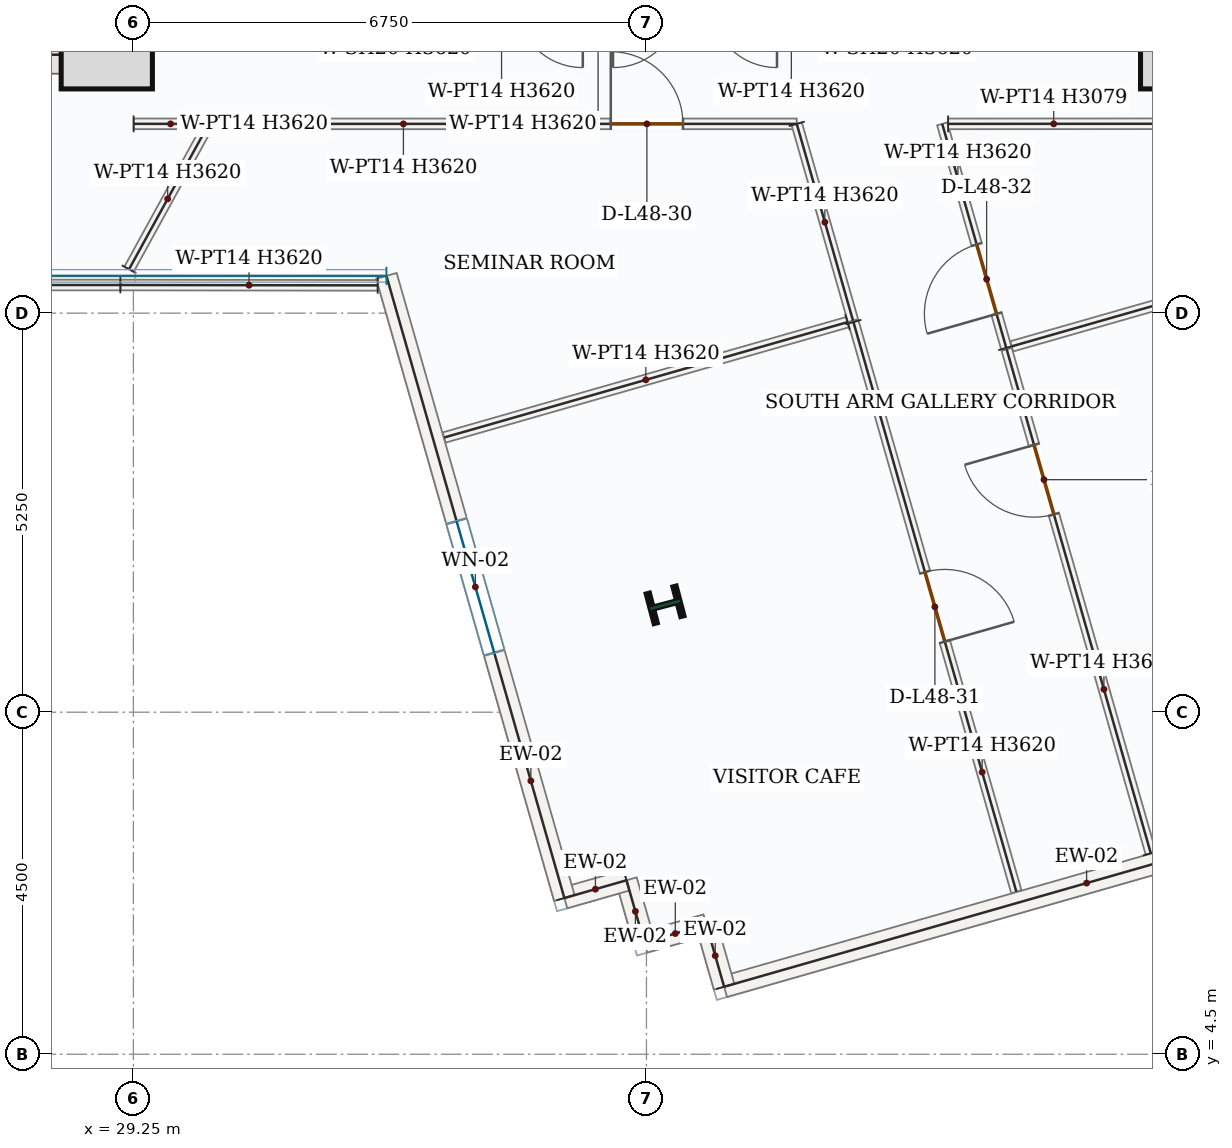
"""IFC4 building model, lengths in metres.
Left out: names, types, materials, properties, quantities, classifications, styles, units other than length and angle.
Written with IfcOpenShell. Run it as: python <this file> out.ifc"""

import sys

from ifc_helpers import new_model, si_unit, direction, frame, frame_2d, origin, origin_2d, place, context, subcontext, project, spatial, rectangle, i_section, extrude, source, transform, mapped, element, fill, save


model = new_model("IFC4")
c1 = context("Model", 3, precision=1e-05, world=origin(), true_north=direction((0.0, 1.0)))
c2 = subcontext(c1, "Body", "Model", "MODEL_VIEW")
j1 = project(units=[si_unit("LENGTHUNIT", "METRE"), si_unit("PLANEANGLEUNIT", "RADIAN")], contexts=[c1])
p1 = place(None, origin())
s1 = spatial("IfcSite", under=j1, at=p1, CompositionType="ELEMENT")
p2 = place(p1, origin())
s2 = spatial("IfcBuilding", under=s1, at=p2, CompositionType="ELEMENT")
p3 = place(p2, frame((0.0, 0.0, 205.8)))
s3 = spatial("IfcBuildingStorey", under=s2, at=p3, CompositionType="ELEMENT", Elevation=205.8)
p4 = place(p3, frame((29.0, 17.4, 0.0), z_axis=(0.0, 0.0, 1.0), x_axis=(0.0, 1.0, 0.0)))
e1 = element("IfcWall", 1, at=p4, inside=s3, PredefinedType="SHEAR", context=c2, shape_type="SweptSolid", body=[
    extrude(rectangle(XDim=8.55, YDim=0.5, at=frame_2d((4.275, 0.0))), origin(), (0.0, 0.0, 1.0), 3.62),
])
p5 = place(p4, frame((6.65, 0.0, 0.0)))
e2 = element("IfcOpeningElement", 2, at=p5, cuts=e1, PredefinedType="OPENING", context=c2, shape_type="SweptSolid", body=[
    extrude(rectangle(XDim=1.1, YDim=2.2, at=frame_2d((0.55, 1.1))), frame((0.0, 0.26, 0.0), z_axis=(0.0, -1.0, 0.0), x_axis=(1.0, 0.0, 0.0)), (0.0, 0.0, 1.0), 0.52),
])
p6 = place(p4, frame((2.7, 0.0, 0.0)))
e3 = element("IfcOpeningElement", 3, at=p6, cuts=e1, PredefinedType="OPENING", context=c2, shape_type="SweptSolid", body=[
    extrude(rectangle(XDim=0.88, YDim=2.1, at=frame_2d((0.44, 1.05))), frame((0.0, 0.26, 0.0), z_axis=(0.0, -1.0, 0.0), x_axis=(1.0, 0.0, 0.0)), (0.0, 0.0, 1.0), 0.52),
])
p7 = place(p4, frame((4.6, 0.0, 0.0)))
e4 = element("IfcOpeningElement", 4, at=p7, cuts=e1, PredefinedType="OPENING", context=c2, shape_type="SweptSolid", body=[
    extrude(rectangle(XDim=0.88, YDim=2.1, at=frame_2d((0.44, 1.05))), frame((0.0, 0.26, 0.0), z_axis=(0.0, -1.0, 0.0), x_axis=(1.0, 0.0, 0.0)), (0.0, 0.0, 1.0), 0.52),
])
m1 = source(origin(), c2, "Body", "SweptSolid", [
    extrude(rectangle(XDim=7.0, YDim=0.5, at=frame_2d((3.5, 0.0))), origin(), (0.0, 0.0, 1.0), 3.62),
])
p8 = place(p3, frame((21.75, 17.65, 0.0), z_axis=(0.0, 0.0, 1.0), x_axis=(1.0, 0.0, 0.0)))
e5 = element("IfcWall", 5, at=p8, inside=s3, PredefinedType="SHEAR", context=c2, shape_type="MappedRepresentation", body=[
    mapped(m1, transform((0.0, 0.0, 0.0), x_axis=(1.0, 0.0, 0.0), y_axis=(0.0, 1.0, 0.0), z_axis=(0.0, 0.0, 1.0), scale=1.0)),
])
m2 = source(origin(), c2, "Body", "SweptSolid", [
    extrude(rectangle(XDim=1.2, YDim=1.2, at=origin_2d()), origin(), (0.0, 0.0, 1.0), 3.9),
])
for number, where, z_axis, x_axis in (
    (6, (28.9, 17.8, 0.0), (0.0, 0.0, 1.0), (1.0, 0.0, 0.0)),
    (7, (43.1, 17.8, 0.0), (0.0, 0.0, 1.0), (1.0, 0.0, 0.0)),
):
    element("IfcColumn", number, at=place(p3, frame(where, z_axis=z_axis, x_axis=x_axis)), inside=s3, PredefinedType="COLUMN", context=c2, shape_type="MappedRepresentation", body=[
        mapped(m2, transform((0.0, 0.0, 0.0), x_axis=(1.0, 0.0, 0.0), y_axis=(0.0, 1.0, 0.0), z_axis=(0.0, 0.0, 1.0), scale=1.0)),
    ])
m3 = source(origin(), c2, "Body", "SweptSolid", [
    extrude(i_section(OverallWidth=0.404, OverallDepth=0.407, WebThickness=0.027, FlangeThickness=0.044, FilletRadius=0.018, at=origin_2d()), origin(), (0.0, 0.0, 1.0), 3.9),
])
p9 = place(p3, frame((36.245, 10.412, 0.0), z_axis=(0.0, 0.0, 1.0), x_axis=(-0.255445757936, 0.966823388604, 0.0)))
e8 = element("IfcColumn", 8, at=p9, inside=s3, PredefinedType="COLUMN", context=c2, shape_type="MappedRepresentation", body=[
    mapped(m3, transform((0.0, 0.0, 0.0), x_axis=(1.0, 0.0, 0.0), y_axis=(0.0, 1.0, 0.0), z_axis=(0.0, 0.0, 1.0), scale=1.0)),
])
m4 = source(origin(), c2, "Body", "SweptSolid", [
    extrude(rectangle(XDim=9.92, YDim=0.28, at=frame_2d((4.96, 0.0))), origin(), (0.0, 0.0, 1.0), 3.62),
])
p10 = place(p3, frame((46.56, 8.115, 0.0), z_axis=(0.0, 0.0, 1.0), x_axis=(-0.961457051276, -0.274955157346, 0.0)))
e9 = element("IfcWall", 9, at=p10, inside=s3, PredefinedType="SOLIDWALL", context=c2, shape_type="MappedRepresentation", body=[
    mapped(m4, transform((0.0, 0.0, 0.0), x_axis=(1.0, 0.0, 0.0), y_axis=(0.0, 1.0, 0.0), z_axis=(0.0, 0.0, 1.0), scale=1.0)),
])
m5 = source(origin(), c2, "Body", "SweptSolid", [
    extrude(rectangle(XDim=0.85, YDim=0.28, at=frame_2d((0.425, 0.0))), origin(), (0.0, 0.0, 1.0), 3.62),
])
for number, where, z_axis, x_axis in (
    (10, (37.022, 5.388, 0.0), (0.0, 0.0, 1.0), (-0.275, 0.961, 0.0)),
    (11, (36.788, 6.205, 0.0), (0.0, 0.0, 1.0), (-0.961, -0.275, 0.0)),
):
    element("IfcWall", number, at=place(p3, frame(where, z_axis=z_axis, x_axis=x_axis)), inside=s3, PredefinedType="SOLIDWALL", context=c2, shape_type="MappedRepresentation", body=[
        mapped(m5, transform((0.0, 0.0, 0.0), x_axis=(1.0, 0.0, 0.0), y_axis=(0.0, 1.0, 0.0), z_axis=(0.0, 0.0, 1.0), scale=1.0)),
    ])
m6 = source(origin(), c2, "Body", "SweptSolid", [
    extrude(rectangle(XDim=0.85, YDim=0.28, at=frame_2d((0.425, 0.0))), origin(), (0.0, 0.0, 1.0), 3.62),
])
p11 = place(p3, frame((35.971, 5.971, 0.0), z_axis=(0.0, 0.0, 1.0), x_axis=(-0.274834915789, 0.961491429532, 0.0)))
e12 = element("IfcWall", 12, at=p11, inside=s3, PredefinedType="SOLIDWALL", context=c2, shape_type="MappedRepresentation", body=[
    mapped(m6, transform((0.0, 0.0, 0.0), x_axis=(1.0, 0.0, 0.0), y_axis=(0.0, 1.0, 0.0), z_axis=(0.0, 0.0, 1.0), scale=1.0)),
])
p12 = place(p3, frame((35.737, 6.789, 0.0), z_axis=(0.0, 0.0, 1.0), x_axis=(-0.961393768724, -0.275176346112, 0.0)))
e13 = element("IfcWall", 13, at=p12, inside=s3, PredefinedType="SOLIDWALL", context=c2, shape_type="MappedRepresentation", body=[
    mapped(m5, transform((0.0, 0.0, 0.0), x_axis=(1.0, 0.0, 0.0), y_axis=(0.0, 1.0, 0.0), z_axis=(0.0, 0.0, 1.0), scale=1.0)),
])
p13 = place(p3, frame((34.92, 6.555, 0.0), z_axis=(0.0, 0.0, 1.0), x_axis=(-0.27496352843, 0.961454657295, 0.0)))
e14 = element("IfcWall", 14, at=p13, inside=s3, PredefinedType="SOLIDWALL", context=c2, shape_type="SweptSolid", body=[
    extrude(rectangle(XDim=8.513, YDim=0.28, at=frame_2d((4.257, 0.0))), origin(), (0.0, 0.0, 1.0), 3.62),
])
p14 = place(p13, frame((3.357, 0.0, 0.85)))
e15 = element("IfcOpeningElement", 15, at=p14, cuts=e14, PredefinedType="OPENING", context=c2, shape_type="SweptSolid", body=[
    extrude(rectangle(XDim=1.8, YDim=1.75, at=frame_2d((0.9, 0.875))), frame((0.0, 0.15, 0.0), z_axis=(0.0, -1.0, 0.0), x_axis=(1.0, 0.0, 0.0)), (0.0, 0.0, 1.0), 0.3),
])
p15 = place(p3, frame((40.734, 13.792, 0.0), z_axis=(0.0, 0.0, 1.0), x_axis=(-0.274984067599, 0.961448783122, 0.0)))
e16 = element("IfcWall", 16, at=p15, inside=s3, PredefinedType="PARTITIONING", context=c2, shape_type="SweptSolid", body=[
    extrude(rectangle(XDim=3.066, YDim=0.14, at=frame_2d((1.533, 0.0))), origin(), (0.0, 0.0, 1.0), 3.62),
])
p16 = place(p15, frame((0.465, 0.0, 0.0)))
e17 = element("IfcOpeningElement", 17, at=p16, cuts=e16, PredefinedType="OPENING", context=c2, shape_type="SweptSolid", body=[
    extrude(rectangle(XDim=0.95, YDim=2.15, at=frame_2d((0.475, 1.075))), frame((0.0, 0.08, 0.0), z_axis=(0.0, -1.0, 0.0), x_axis=(1.0, 0.0, 0.0)), (0.0, 0.0, 1.0), 0.16),
])
m7 = source(origin(), c2, "Body", "SweptSolid", [
    extrude(rectangle(XDim=2.778, YDim=0.14, at=frame_2d((1.389, 0.0))), origin(), (0.0, 0.0, 1.0), 3.079),
])
p17 = place(p3, frame((39.969, 16.74, 0.0), z_axis=(0.0, 0.0, 1.0), x_axis=(0.999999903427, 0.000439483125, 0.0)))
e18 = element("IfcWall", 18, at=p17, inside=s3, PredefinedType="PARTITIONING", context=c2, shape_type="MappedRepresentation", body=[
    mapped(m7, transform((0.0, 0.0, 0.0), x_axis=(1.0, 0.0, 0.0), y_axis=(0.0, 1.0, 0.0), z_axis=(0.0, 0.0, 1.0), scale=1.0)),
])
m8 = source(origin(), c2, "Body", "SweptSolid", [
    extrude(rectangle(XDim=10.785, YDim=0.14, at=frame_2d((5.393, 0.0))), origin(), (0.0, 0.0, 1.0), 3.079),
])
p18 = place(p3, frame((51.176, 16.779, 0.0), z_axis=(0.0, 0.0, 1.0), x_axis=(-0.961454726908, -0.274963285016, 0.0)))
e19 = element("IfcWall", 19, at=p18, inside=s3, PredefinedType="PARTITIONING", context=c2, shape_type="MappedRepresentation", body=[
    mapped(m8, transform((0.0, 0.0, 0.0), x_axis=(1.0, 0.0, 0.0), y_axis=(0.0, 1.0, 0.0), z_axis=(0.0, 0.0, 1.0), scale=1.0)),
])
p19 = place(p3, frame((30.225, 16.74, 0.0), z_axis=(0.0, 0.0, 1.0), x_axis=(1.0, 0.0, 0.0)))
e20 = element("IfcWall", 20, at=p19, inside=s3, PredefinedType="PARTITIONING", context=c2, shape_type="SweptSolid", body=[
    extrude(rectangle(XDim=7.753, YDim=0.14, at=frame_2d((3.876, 0.0))), origin(), (0.0, 0.0, 1.0), 3.62),
])
p20 = place(p19, frame((5.306, 0.0, 0.0)))
e21 = element("IfcOpeningElement", 21, at=p20, cuts=e20, PredefinedType="OPENING", context=c2, shape_type="SweptSolid", body=[
    extrude(rectangle(XDim=0.95, YDim=2.15, at=frame_2d((0.475, 1.075))), frame((0.0, 0.08, 0.0), z_axis=(0.0, -1.0, 0.0), x_axis=(1.0, 0.0, 0.0)), (0.0, 0.0, 1.0), 0.16),
])
m9 = source(origin(), c2, "Body", "SweptSolid", [
    extrude(rectangle(XDim=2.692, YDim=0.14, at=frame_2d((1.346, 0.0))), origin(), (0.0, 0.0, 1.0), 3.62),
])
p21 = place(p3, frame((37.977, 16.74, 0.0), z_axis=(0.0, 0.0, 1.0), x_axis=(0.27500862401, -0.961441759401, 0.0)))
e22 = element("IfcWall", 22, at=p21, inside=s3, PredefinedType="PARTITIONING", context=c2, shape_type="MappedRepresentation", body=[
    mapped(m9, transform((0.0, 0.0, 0.0), x_axis=(1.0, 0.0, 0.0), y_axis=(0.0, 1.0, 0.0), z_axis=(0.0, 0.0, 1.0), scale=1.0)),
])
m10 = source(origin(), c2, "Body", "SweptSolid", [
    extrude(rectangle(XDim=5.52, YDim=0.14, at=frame_2d((2.76, 0.0))), origin(), (0.0, 0.0, 1.0), 3.62),
])
p22 = place(p3, frame((38.646, 14.131, 0.0), z_axis=(0.0, 0.0, 1.0), x_axis=(-0.961455490798, -0.274960613933, 0.0)))
e23 = element("IfcWall", 23, at=p22, inside=s3, PredefinedType="PARTITIONING", context=c2, shape_type="MappedRepresentation", body=[
    mapped(m10, transform((0.0, 0.0, 0.0), x_axis=(1.0, 0.0, 0.0), y_axis=(0.0, 1.0, 0.0), z_axis=(0.0, 0.0, 1.0), scale=1.0)),
])
m11 = source(origin(), c2, "Body", "SweptSolid", [
    extrude(rectangle(XDim=3.385, YDim=0.14, at=frame_2d((1.693, 0.0))), origin(), (0.0, 0.0, 1.0), 3.62),
])
p23 = place(p3, frame((32.464, 14.615, 0.0), z_axis=(0.0, 0.0, 1.0), x_axis=(-0.999999061333, 0.001370158085, 0.0)))
e24 = element("IfcWall", 24, at=p23, inside=s3, PredefinedType="PARTITIONING", context=c2, shape_type="MappedRepresentation", body=[
    mapped(m11, transform((0.0, 0.0, 0.0), x_axis=(1.0, 0.0, 0.0), y_axis=(0.0, 1.0, 0.0), z_axis=(0.0, 0.0, 1.0), scale=1.0)),
])
m12 = source(origin(), c2, "Body", "SweptSolid", [
    extrude(rectangle(XDim=2.111, YDim=0.14, at=frame_2d((1.056, 0.0))), origin(), (0.0, 0.0, 1.0), 3.62),
])
p24 = place(p3, frame((29.193, 14.827, 0.0), z_axis=(0.0, 0.0, 1.0), x_axis=(0.481297142313, 0.876557505702, 0.0)))
e25 = element("IfcWall", 25, at=p24, inside=s3, PredefinedType="PARTITIONING", context=c2, shape_type="MappedRepresentation", body=[
    mapped(m12, transform((0.0, 0.0, 0.0), x_axis=(1.0, 0.0, 0.0), y_axis=(0.0, 1.0, 0.0), z_axis=(0.0, 0.0, 1.0), scale=1.0)),
])
p25 = place(p3, frame((42.635, 7.144, 0.0), z_axis=(0.0, 0.0, 1.0), x_axis=(-0.274973646468, 0.96145176361, 0.0)))
e26 = element("IfcWall", 26, at=p25, inside=s3, PredefinedType="PARTITIONING", context=c2, shape_type="SweptSolid", body=[
    extrude(rectangle(XDim=6.895, YDim=0.14, at=frame_2d((3.448, 0.0))), origin(), (0.0, 0.0, 1.0), 3.62),
])
p26 = place(p25, frame((4.637, 0.0, 0.0)))
e27 = element("IfcOpeningElement", 27, at=p26, cuts=e26, PredefinedType="OPENING", context=c2, shape_type="SweptSolid", body=[
    extrude(rectangle(XDim=0.95, YDim=2.15, at=frame_2d((0.475, 1.075))), frame((0.0, 0.08, 0.0), z_axis=(0.0, -1.0, 0.0), x_axis=(1.0, 0.0, 0.0)), (0.0, 0.0, 1.0), 0.16),
])
p27 = place(p3, frame((38.723, 14.133, 0.0), z_axis=(0.0, 0.0, 1.0), x_axis=(0.274985856522, -0.96144827147, 0.0)))
e28 = element("IfcWall", 28, at=p27, inside=s3, PredefinedType="PARTITIONING", context=c2, shape_type="SweptSolid", body=[
    extrude(rectangle(XDim=7.795, YDim=0.14, at=frame_2d((3.897, 0.0))), origin(), (0.0, 0.0, 1.0), 3.62),
])
p28 = place(p27, frame((3.423, 0.0, 0.0)))
e29 = element("IfcOpeningElement", 29, at=p28, cuts=e28, PredefinedType="OPENING", context=c2, shape_type="SweptSolid", body=[
    extrude(rectangle(XDim=0.95, YDim=2.15, at=frame_2d((0.475, 1.075))), frame((0.0, 0.08, 0.0), z_axis=(0.0, -1.0, 0.0), x_axis=(1.0, 0.0, 0.0)), (0.0, 0.0, 1.0), 0.16),
])
m13 = source(origin(), c2, "Body", "SweptSolid", [
    extrude(rectangle(XDim=0.971, YDim=0.14, at=frame_2d((0.486, 0.0))), origin(), (0.0, 0.0, 1.0), 3.62),
])
p29 = place(p3, frame((29.253, 16.74, 0.0), z_axis=(0.0, 0.0, 1.0), x_axis=(0.999999873614, -0.000502765145, 0.0)))
e30 = element("IfcWall", 30, at=p29, inside=s3, PredefinedType="PARTITIONING", context=c2, shape_type="MappedRepresentation", body=[
    mapped(m13, transform((0.0, 0.0, 0.0), x_axis=(1.0, 0.0, 0.0), y_axis=(0.0, 1.0, 0.0), z_axis=(0.0, 0.0, 1.0), scale=1.0)),
])
m14 = source(origin(), c2, "Body", "SweptSolid", [
    extrude(rectangle(XDim=6.47, YDim=0.14, at=frame_2d((3.235, 0.0))), origin(), (0.0, 0.0, 1.0), 3.62),
])
p30 = place(p3, frame((29.079, 14.62, 0.0), z_axis=(0.0, 0.0, 1.0), x_axis=(-1.0, 0.0, 0.0)))
e31 = element("IfcWall", 31, at=p30, inside=s3, PredefinedType="PARTITIONING", context=c2, shape_type="MappedRepresentation", body=[
    mapped(m14, transform((0.0, 0.0, 0.0), x_axis=(1.0, 0.0, 0.0), y_axis=(0.0, 1.0, 0.0), z_axis=(0.0, 0.0, 1.0), scale=1.0)),
])
m15 = source(origin(), c2, "Body", "SweptSolid", [
    extrude(rectangle(XDim=1.8, YDim=1.75, at=frame_2d((0.9, 0.875))), frame((0.0, 0.03, 0.0), z_axis=(0.0, -1.0, 0.0), x_axis=(1.0, 0.0, 0.0)), (0.0, 0.0, 1.0), 0.06),
])
p31 = place(p14, origin())
e32 = element("IfcWindow", 32, at=p31, inside=s3, PartitioningType="DOUBLE_PANEL_VERTICAL", PredefinedType="WINDOW", context=c2, shape_type="MappedRepresentation", body=[
    mapped(m15, transform((0.0, 0.0, 0.0), x_axis=(1.0, 0.0, 0.0), y_axis=(0.0, 1.0, 0.0), z_axis=(0.0, 0.0, 1.0), scale=1.0)),
])
fill(e15, e32)
m16 = source(origin(), c2, "Body", "SweptSolid", [
    extrude(rectangle(XDim=0.95, YDim=2.15, at=frame_2d((0.475, 1.075))), frame((0.0, 0.025, 0.0), z_axis=(0.0, -1.0, 0.0), x_axis=(1.0, 0.0, 0.0)), (0.0, 0.0, 1.0), 0.05),
])
p32 = place(p20, origin())
e33 = element("IfcDoor", 33, at=p32, inside=s3, OperationType="SINGLE_SWING_LEFT", PredefinedType="DOOR", context=c2, shape_type="MappedRepresentation", body=[
    mapped(m16, transform((0.0, 0.0, 0.0), x_axis=(1.0, 0.0, 0.0), y_axis=(0.0, 1.0, 0.0), z_axis=(0.0, 0.0, 1.0), scale=1.0)),
])
fill(e21, e33)
p33 = place(p28, origin())
e34 = element("IfcDoor", 34, at=p33, inside=s3, OperationType="SINGLE_SWING_RIGHT", PredefinedType="DOOR", context=c2, shape_type="MappedRepresentation", body=[
    mapped(m16, transform((0.0, 0.0, 0.0), x_axis=(1.0, 0.0, 0.0), y_axis=(0.0, 1.0, 0.0), z_axis=(0.0, 0.0, 1.0), scale=1.0)),
])
fill(e29, e34)
p34 = place(p16, origin())
e35 = element("IfcDoor", 35, at=p34, inside=s3, OperationType="SINGLE_SWING_LEFT", PredefinedType="DOOR", context=c2, shape_type="MappedRepresentation", body=[
    mapped(m16, transform((0.0, 0.0, 0.0), x_axis=(1.0, 0.0, 0.0), y_axis=(0.0, 1.0, 0.0), z_axis=(0.0, 0.0, 1.0), scale=1.0)),
])
fill(e17, e35)
p35 = place(p26, origin())
e36 = element("IfcDoor", 36, at=p35, inside=s3, OperationType="SINGLE_SWING_RIGHT", PredefinedType="DOOR", context=c2, shape_type="MappedRepresentation", body=[
    mapped(m16, transform((0.0, 0.0, 0.0), x_axis=(1.0, 0.0, 0.0), y_axis=(0.0, 1.0, 0.0), z_axis=(0.0, 0.0, 1.0), scale=1.0)),
])
fill(e27, e36)
save(model, sys.argv[1])
